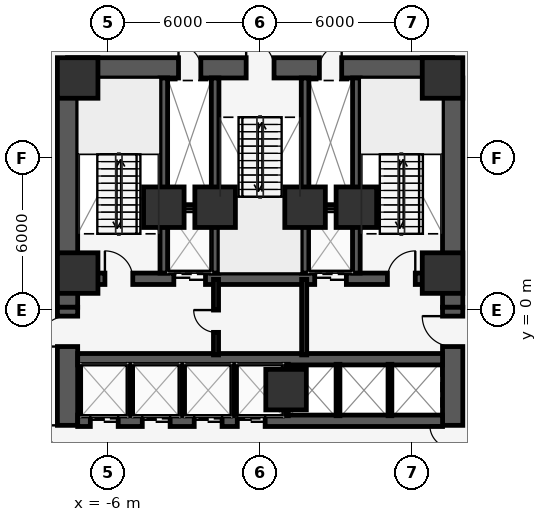
"""IFC4 building model, lengths in metres.
Left out: names, types, materials, properties, quantities, classifications, styles, units other than length and angle.
Written with IfcOpenShell. Run it as: python <this file> out.ifc"""

import sys

from ifc_helpers import new_model, si_unit, direction, frame, frame_2d, origin, origin_2d, place, context, subcontext, project, spatial, rectangle, extrude, element, fill, save


model = new_model("IFC4")
c1 = context("Model", 3, precision=1e-05, world=origin(), true_north=direction((0.0, 1.0)))
c2 = subcontext(c1, "Body", "Model", "MODEL_VIEW")
j1 = project(units=[si_unit("LENGTHUNIT", "METRE"), si_unit("PLANEANGLEUNIT", "RADIAN")], contexts=[c1])
p1 = place(None, origin())
s1 = spatial("IfcSite", under=j1, at=p1, CompositionType="ELEMENT")
p2 = place(p1, origin())
s2 = spatial("IfcBuilding", under=s1, at=p2, CompositionType="ELEMENT")
p3 = place(p2, frame((0.0, 0.0, 50.4)))
s3 = spatial("IfcBuildingStorey", under=s2, at=p3, CompositionType="ELEMENT", Elevation=50.4)
p4 = place(p3, frame((-7.6, 9.55, 0.0), z_axis=(0.0, 0.0, 1.0), x_axis=(1.0, 0.0, 0.0)))
e1 = element("IfcWall", 1, at=p4, inside=s3, PredefinedType="SHEAR", context=c2, shape_type="SweptSolid", body=[
    extrude(rectangle(XDim=15.2, YDim=0.8, at=frame_2d((7.6, 0.0))), origin(), (0.0, 0.0, 1.0), 3.75),
])
p5 = place(p4, frame((7.05, 0.0, 0.0)))
e2 = element("IfcOpeningElement", 2, at=p5, cuts=e1, PredefinedType="OPENING", context=c2, shape_type="SweptSolid", body=[
    extrude(rectangle(XDim=1.1, YDim=2.15, at=frame_2d((0.55, 1.075))), frame((0.0, 0.41, 0.0), z_axis=(0.0, -1.0, 0.0), x_axis=(1.0, 0.0, 0.0)), (0.0, 0.0, 1.0), 0.82),
])
p6 = place(p4, frame((4.38, 0.0, 0.0)))
e3 = element("IfcOpeningElement", 3, at=p6, cuts=e1, PredefinedType="OPENING", context=c2, shape_type="SweptSolid", body=[
    extrude(rectangle(XDim=0.88, YDim=2.15, at=frame_2d((0.44, 1.075))), frame((0.0, 0.41, 0.0), z_axis=(0.0, -1.0, 0.0), x_axis=(1.0, 0.0, 0.0)), (0.0, 0.0, 1.0), 0.82),
])
p7 = place(p4, frame((9.94, 0.0, 0.0)))
e4 = element("IfcOpeningElement", 4, at=p7, cuts=e1, PredefinedType="OPENING", context=c2, shape_type="SweptSolid", body=[
    extrude(rectangle(XDim=0.88, YDim=2.15, at=frame_2d((0.44, 1.075))), frame((0.0, 0.41, 0.0), z_axis=(0.0, -1.0, 0.0), x_axis=(1.0, 0.0, 0.0)), (0.0, 0.0, 1.0), 0.82),
])
p8 = place(p3, frame((-7.2, 1.225, 0.0), z_axis=(0.0, 0.0, 1.0), x_axis=(1.0, 0.0, 0.0)))
e5 = element("IfcWall", 5, at=p8, inside=s3, PredefinedType="SHEAR", context=c2, shape_type="SweptSolid", body=[
    extrude(rectangle(XDim=14.4, YDim=0.45, at=frame_2d((7.2, 0.0))), origin(), (0.0, 0.0, 1.0), 3.75),
])
p9 = place(p8, frame((3.795, 0.0, 0.0)))
e6 = element("IfcOpeningElement", 6, at=p9, cuts=e5, PredefinedType="OPENING", context=c2, shape_type="SweptSolid", body=[
    extrude(rectangle(XDim=1.25, YDim=2.25, at=frame_2d((0.625, 1.125))), frame((0.0, 0.235, 0.0), z_axis=(0.0, -1.0, 0.0), x_axis=(1.0, 0.0, 0.0)), (0.0, 0.0, 1.0), 0.47),
])
p10 = place(p8, frame((9.355, 0.0, 0.0)))
e7 = element("IfcOpeningElement", 7, at=p10, cuts=e5, PredefinedType="OPENING", context=c2, shape_type="SweptSolid", body=[
    extrude(rectangle(XDim=1.25, YDim=2.25, at=frame_2d((0.625, 1.125))), frame((0.0, 0.235, 0.0), z_axis=(0.0, -1.0, 0.0), x_axis=(1.0, 0.0, 0.0)), (0.0, 0.0, 1.0), 0.47),
])
p11 = place(p8, frame((1.075, 0.0, 0.0)))
e8 = element("IfcOpeningElement", 8, at=p11, cuts=e5, PredefinedType="OPENING", context=c2, shape_type="SweptSolid", body=[
    extrude(rectangle(XDim=1.1, YDim=2.15, at=frame_2d((0.55, 1.075))), frame((0.0, 0.235, 0.0), z_axis=(0.0, -1.0, 0.0), x_axis=(1.0, 0.0, 0.0)), (0.0, 0.0, 1.0), 0.47),
])
p12 = place(p8, frame((12.225, 0.0, 0.0)))
e9 = element("IfcOpeningElement", 9, at=p12, cuts=e5, PredefinedType="OPENING", context=c2, shape_type="SweptSolid", body=[
    extrude(rectangle(XDim=1.1, YDim=2.15, at=frame_2d((0.55, 1.075))), frame((0.0, 0.235, 0.0), z_axis=(0.0, -1.0, 0.0), x_axis=(1.0, 0.0, 0.0)), (0.0, 0.0, 1.0), 0.47),
])
for number, where, z_axis, x_axis in (
    (10, (-3.8, 1.45, 0.0), (0.0, 0.0, 1.0), (0.0, 1.0, 0.0)),
    (11, (-1.775, 1.45, 0.0), (0.0, 0.0, 1.0), (0.0, 1.0, 0.0)),
    (12, (1.775, 1.45, 0.0), (0.0, 0.0, 1.0), (0.0, 1.0, 0.0)),
    (13, (3.8, 1.45, 0.0), (0.0, 0.0, 1.0), (0.0, 1.0, 0.0)),
):
    element("IfcWall", number, at=place(p3, frame(where, z_axis=z_axis, x_axis=x_axis)), inside=s3, PredefinedType="SHEAR", context=c2, shape_type="SweptSolid", body=[
        extrude(rectangle(XDim=7.7, YDim=0.3, at=frame_2d((3.85, 0.0))), origin(), (0.0, 0.0, 1.0), 3.75),
    ])
for number, where, z_axis, x_axis in (
    (14, (-7.6, 0.1, 0.0), (0.0, 0.0, 1.0), (0.0, 1.0, 0.0)),
    (15, (7.6, 0.1, 0.0), (0.0, 0.0, 1.0), (0.0, 1.0, 0.0)),
):
    element("IfcWall", number, at=place(p3, frame(where, z_axis=z_axis, x_axis=x_axis)), inside=s3, PredefinedType="SHEAR", context=c2, shape_type="SweptSolid", body=[
        extrude(rectangle(XDim=9.05, YDim=0.8, at=frame_2d((4.525, 0.0))), origin(), (0.0, 0.0, 1.0), 3.75),
    ])
p13 = place(p3, frame((-7.6, -8.85, 0.0), z_axis=(0.0, 0.0, 1.0), x_axis=(0.0, 1.0, 0.0)))
e16 = element("IfcWall", 16, at=p13, inside=s3, PredefinedType="SHEAR", context=c2, shape_type="SweptSolid", body=[
    extrude(rectangle(XDim=8.95, YDim=0.8, at=frame_2d((4.475, 0.0))), origin(), (0.0, 0.0, 1.0), 3.75),
])
p14 = place(p13, frame((2.49, 0.0, 0.0)))
e17 = element("IfcOpeningElement", 17, at=p14, cuts=e16, PredefinedType="OPENING", context=c2, shape_type="SweptSolid", body=[
    extrude(rectangle(XDim=1.8, YDim=2.2, at=frame_2d((0.9, 1.1))), frame((0.0, 0.41, 0.0), z_axis=(0.0, -1.0, 0.0), x_axis=(1.0, 0.0, 0.0)), (0.0, 0.0, 1.0), 0.82),
])
p15 = place(p13, frame((7.4, 0.0, 0.0)))
e18 = element("IfcOpeningElement", 18, at=p15, cuts=e16, PredefinedType="OPENING", context=c2, shape_type="SweptSolid", body=[
    extrude(rectangle(XDim=1.2, YDim=2.15, at=frame_2d((0.6, 1.075))), frame((0.0, 0.41, 0.0), z_axis=(0.0, -1.0, 0.0), x_axis=(1.0, 0.0, 0.0)), (0.0, 0.0, 1.0), 0.82),
])
p16 = place(p3, frame((7.6, -8.85, 0.0), z_axis=(0.0, 0.0, 1.0), x_axis=(0.0, 1.0, 0.0)))
e19 = element("IfcWall", 19, at=p16, inside=s3, PredefinedType="SHEAR", context=c2, shape_type="SweptSolid", body=[
    extrude(rectangle(XDim=8.95, YDim=0.8, at=frame_2d((4.475, 0.0))), origin(), (0.0, 0.0, 1.0), 3.75),
])
p17 = place(p16, frame((2.49, 0.0, 0.0)))
e20 = element("IfcOpeningElement", 20, at=p17, cuts=e19, PredefinedType="OPENING", context=c2, shape_type="SweptSolid", body=[
    extrude(rectangle(XDim=1.8, YDim=2.2, at=frame_2d((0.9, 1.1))), frame((0.0, 0.41, 0.0), z_axis=(0.0, -1.0, 0.0), x_axis=(1.0, 0.0, 0.0)), (0.0, 0.0, 1.0), 0.82),
])
p18 = place(p16, frame((7.4, 0.0, 0.0)))
e21 = element("IfcOpeningElement", 21, at=p18, cuts=e19, PredefinedType="OPENING", context=c2, shape_type="SweptSolid", body=[
    extrude(rectangle(XDim=1.2, YDim=2.15, at=frame_2d((0.6, 1.075))), frame((0.0, 0.41, 0.0), z_axis=(0.0, -1.0, 0.0), x_axis=(1.0, 0.0, 0.0)), (0.0, 0.0, 1.0), 0.82),
])
p19 = place(p3, frame((-7.2, -1.95, 0.0), z_axis=(0.0, 0.0, 1.0), x_axis=(1.0, 0.0, 0.0)))
e22 = element("IfcWall", 22, at=p19, inside=s3, PredefinedType="SHEAR", context=c2, shape_type="SweptSolid", body=[
    extrude(rectangle(XDim=14.4, YDim=0.45, at=frame_2d((7.2, 0.0))), origin(), (0.0, 0.0, 1.0), 3.75),
])
p20 = place(p3, frame((-7.2, -4.38, 0.0), z_axis=(0.0, 0.0, 1.0), x_axis=(1.0, 0.0, 0.0)))
e23 = element("IfcWall", 23, at=p20, inside=s3, PredefinedType="SHEAR", context=c2, shape_type="SweptSolid", body=[
    extrude(rectangle(XDim=14.4, YDim=0.45, at=frame_2d((7.2, 0.0))), origin(), (0.0, 0.0, 1.0), 3.75),
])
p21 = place(p20, frame((0.5, 0.0, 0.0)))
e24 = element("IfcOpeningElement", 24, at=p21, cuts=e23, PredefinedType="OPENING", context=c2, shape_type="SweptSolid", body=[
    extrude(rectangle(XDim=1.1, YDim=2.2, at=frame_2d((0.55, 1.1))), frame((0.0, 0.235, 0.0), z_axis=(0.0, -1.0, 0.0), x_axis=(1.0, 0.0, 0.0)), (0.0, 0.0, 1.0), 0.47),
])
p22 = place(p20, frame((2.55, 0.0, 0.0)))
e25 = element("IfcOpeningElement", 25, at=p22, cuts=e23, PredefinedType="OPENING", context=c2, shape_type="SweptSolid", body=[
    extrude(rectangle(XDim=1.1, YDim=2.2, at=frame_2d((0.55, 1.1))), frame((0.0, 0.235, 0.0), z_axis=(0.0, -1.0, 0.0), x_axis=(1.0, 0.0, 0.0)), (0.0, 0.0, 1.0), 0.47),
])
p23 = place(p20, frame((4.6, 0.0, 0.0)))
e26 = element("IfcOpeningElement", 26, at=p23, cuts=e23, PredefinedType="OPENING", context=c2, shape_type="SweptSolid", body=[
    extrude(rectangle(XDim=1.1, YDim=2.2, at=frame_2d((0.55, 1.1))), frame((0.0, 0.235, 0.0), z_axis=(0.0, -1.0, 0.0), x_axis=(1.0, 0.0, 0.0)), (0.0, 0.0, 1.0), 0.47),
])
p24 = place(p20, frame((6.3, 0.0, 0.0)))
e27 = element("IfcOpeningElement", 27, at=p24, cuts=e23, PredefinedType="OPENING", context=c2, shape_type="SweptSolid", body=[
    extrude(rectangle(XDim=1.1, YDim=2.2, at=frame_2d((0.55, 1.1))), frame((0.0, 0.235, 0.0), z_axis=(0.0, -1.0, 0.0), x_axis=(1.0, 0.0, 0.0)), (0.0, 0.0, 1.0), 0.47),
])
for number, where, z_axis, x_axis in (
    (28, (7.2, 1.45, 0.0), (0.0, 0.0, 1.0), (1.0, 0.0, 0.0)),
    (29, (7.2, 9.15, 0.0), (0.0, 0.0, 1.0), (1.0, 0.0, 0.0)),
    (30, (-7.2, 9.15, 0.0), (0.0, 0.0, 1.0), (1.0, 0.0, 0.0)),
    (31, (-7.2, 1.45, 0.0), (0.0, 0.0, 1.0), (1.0, 0.0, 0.0)),
    (32, (-3.8, 4.05, 0.0), (0.0, 0.0, 1.0), (1.0, 0.0, 0.0)),
    (33, (3.8, 4.05, 0.0), (0.0, 0.0, 1.0), (1.0, 0.0, 0.0)),
    (34, (-1.775, 4.05, 0.0), (0.0, 0.0, 1.0), (1.0, 0.0, 0.0)),
    (35, (1.775, 4.05, 0.0), (0.0, 0.0, 1.0), (1.0, 0.0, 0.0)),
    (36, (1.025, -3.15, 0.0), (0.0, 0.0, 1.0), (1.0, 0.0, 0.0)),
):
    element("IfcColumn", number, at=place(p3, frame(where, z_axis=z_axis, x_axis=x_axis)), inside=s3, PredefinedType="COLUMN", context=c2, shape_type="SweptSolid", body=[
        extrude(rectangle(XDim=1.6, YDim=1.6, at=origin_2d()), origin(), (0.0, 0.0, 1.0), 4.0),
    ])
p25 = place(p3, frame((4.923, 41.122, 0.0), z_axis=(0.0, 0.0, 1.0), x_axis=(0.504213113214, -0.863579258935, 0.0)))
e37 = element("IfcWall", 37, at=p25, inside=s3, PredefinedType="STANDARD", context=c2, shape_type="SweptSolid", body=[
    extrude(rectangle(XDim=67.041, YDim=0.32, at=frame_2d((33.521, 0.0))), origin(), (0.0, 0.0, 1.0), 3.75),
])
p26 = place(p25, frame((33.021, 0.0, 0.0)))
e38 = element("IfcOpeningElement", 38, at=p26, cuts=e37, PredefinedType="OPENING", context=c2, shape_type="SweptSolid", body=[
    extrude(rectangle(XDim=1.0, YDim=2.15, at=frame_2d((0.5, 1.075))), frame((0.0, 0.17, 0.0), z_axis=(0.0, -1.0, 0.0), x_axis=(1.0, 0.0, 0.0)), (0.0, 0.0, 1.0), 0.34),
])
p27 = place(p3, frame((-38.726, -16.773, 0.0), z_axis=(0.0, 0.0, 1.0), x_axis=(0.504213113214, 0.863579258935, 0.0)))
e39 = element("IfcWall", 39, at=p27, inside=s3, PredefinedType="STANDARD", context=c2, shape_type="SweptSolid", body=[
    extrude(rectangle(XDim=67.041, YDim=0.32, at=frame_2d((33.521, 0.0))), origin(), (0.0, 0.0, 1.0), 3.75),
])
p28 = place(p27, frame((33.021, 0.0, 0.0)))
e40 = element("IfcOpeningElement", 40, at=p28, cuts=e39, PredefinedType="OPENING", context=c2, shape_type="SweptSolid", body=[
    extrude(rectangle(XDim=1.0, YDim=2.15, at=frame_2d((0.5, 1.075))), frame((0.0, 0.17, 0.0), z_axis=(0.0, -1.0, 0.0), x_axis=(1.0, 0.0, 0.0)), (0.0, 0.0, 1.0), 0.34),
])
for number, where, z_axis, x_axis in (
    (41, (-3.65, 4.05, 0.0), (0.0, 0.0, 1.0), (1.0, 0.0, 0.0)),
    (42, (1.92, 4.05, 0.0), (0.0, 0.0, 1.0), (1.0, 0.0, 0.0)),
):
    element("IfcWall", number, at=place(p3, frame(where, z_axis=z_axis, x_axis=x_axis)), inside=s3, PredefinedType="PARTITIONING", context=c2, shape_type="SweptSolid", body=[
        extrude(rectangle(XDim=1.73, YDim=0.2, at=frame_2d((0.865, 0.0))), origin(), (0.0, 0.0, 1.0), 3.75),
    ])
for number, where, z_axis, x_axis in (
    (43, (-5.125, -4.18, 0.0), (0.0, 0.0, 1.0), (0.0, 1.0, 0.0)),
    (44, (-3.075, -4.18, 0.0), (0.0, 0.0, 1.0), (0.0, 1.0, 0.0)),
    (45, (-1.025, -4.18, 0.0), (0.0, 0.0, 1.0), (0.0, 1.0, 0.0)),
):
    element("IfcWall", number, at=place(p3, frame(where, z_axis=z_axis, x_axis=x_axis)), inside=s3, PredefinedType="PARTITIONING", context=c2, shape_type="SweptSolid", body=[
        extrude(rectangle(XDim=2.03, YDim=0.15, at=frame_2d((1.015, 0.0))), origin(), (0.0, 0.0, 1.0), 3.75),
    ])
p29 = place(p3, frame((1.025, -4.18, 0.0), z_axis=(0.0, 0.0, 1.0), x_axis=(0.0, 1.0, 0.0)))
e46 = element("IfcWall", 46, at=p29, inside=s3, PredefinedType="PARTITIONING", context=c2, shape_type="SweptSolid", body=[
    extrude(rectangle(XDim=2.03, YDim=0.18, at=frame_2d((1.015, 0.0))), origin(), (0.0, 0.0, 1.0), 2.798),
])
for number, where, z_axis, x_axis in (
    (47, (3.075, -4.18, 0.0), (0.0, 0.0, 1.0), (0.0, 1.0, 0.0)),
    (48, (5.125, -4.18, 0.0), (0.0, 0.0, 1.0), (0.0, 1.0, 0.0)),
):
    element("IfcWall", number, at=place(p3, frame(where, z_axis=z_axis, x_axis=x_axis)), inside=s3, PredefinedType="PARTITIONING", context=c2, shape_type="SweptSolid", body=[
        extrude(rectangle(XDim=2.03, YDim=0.15, at=frame_2d((1.015, 0.0))), origin(), (0.0, 0.0, 1.0), 3.75),
    ])
p30 = place(p3, frame((-1.74, -1.78, 0.0), z_axis=(0.0, 0.0, 1.0), x_axis=(0.0, 1.0, 0.0)))
e49 = element("IfcWall", 49, at=p30, inside=s3, PredefinedType="PARTITIONING", context=c2, shape_type="SweptSolid", body=[
    extrude(rectangle(XDim=2.98, YDim=0.2, at=frame_2d((1.49, 0.0))), origin(), (0.0, 0.0, 1.0), 3.75),
])
p31 = place(p30, frame((0.89, 0.0, 0.0)))
e50 = element("IfcOpeningElement", 50, at=p31, cuts=e49, PredefinedType="OPENING", context=c2, shape_type="SweptSolid", body=[
    extrude(rectangle(XDim=0.88, YDim=2.15, at=frame_2d((0.44, 1.075))), frame((0.0, 0.11, 0.0), z_axis=(0.0, -1.0, 0.0), x_axis=(1.0, 0.0, 0.0)), (0.0, 0.0, 1.0), 0.22),
])
p32 = place(p3, frame((1.74, -1.78, 0.0), z_axis=(0.0, 0.0, 1.0), x_axis=(0.0, 1.0, 0.0)))
e51 = element("IfcWall", 51, at=p32, inside=s3, PredefinedType="PARTITIONING", context=c2, shape_type="SweptSolid", body=[
    extrude(rectangle(XDim=2.98, YDim=0.2, at=frame_2d((1.49, 0.0))), origin(), (0.0, 0.0, 1.0), 3.75),
])
p33 = place(p21, origin())
e52 = element("IfcDoor", 52, at=p33, inside=s3, OperationType="DOUBLE_DOOR_SLIDING", PredefinedType="DOOR", context=c2, shape_type="SweptSolid", body=[
    extrude(rectangle(XDim=1.1, YDim=2.2, at=frame_2d((0.55, 1.1))), frame((0.0, 0.025, 0.0), z_axis=(0.0, -1.0, 0.0), x_axis=(1.0, 0.0, 0.0)), (0.0, 0.0, 1.0), 0.05),
])
fill(e24, e52)
p34 = place(p22, origin())
e53 = element("IfcDoor", 53, at=p34, inside=s3, OperationType="DOUBLE_DOOR_SLIDING", PredefinedType="DOOR", context=c2, shape_type="SweptSolid", body=[
    extrude(rectangle(XDim=1.1, YDim=2.2, at=frame_2d((0.55, 1.1))), frame((0.0, 0.025, 0.0), z_axis=(0.0, -1.0, 0.0), x_axis=(1.0, 0.0, 0.0)), (0.0, 0.0, 1.0), 0.05),
])
fill(e25, e53)
p35 = place(p23, origin())
e54 = element("IfcDoor", 54, at=p35, inside=s3, OperationType="DOUBLE_DOOR_SLIDING", PredefinedType="DOOR", context=c2, shape_type="SweptSolid", body=[
    extrude(rectangle(XDim=1.1, YDim=2.2, at=frame_2d((0.55, 1.1))), frame((0.0, 0.025, 0.0), z_axis=(0.0, -1.0, 0.0), x_axis=(1.0, 0.0, 0.0)), (0.0, 0.0, 1.0), 0.05),
])
fill(e26, e54)
p36 = place(p24, origin())
e55 = element("IfcDoor", 55, at=p36, inside=s3, OperationType="DOUBLE_DOOR_SLIDING", PredefinedType="DOOR", context=c2, shape_type="SweptSolid", body=[
    extrude(rectangle(XDim=1.1, YDim=2.2, at=frame_2d((0.55, 1.1))), frame((0.0, 0.025, 0.0), z_axis=(0.0, -1.0, 0.0), x_axis=(1.0, 0.0, 0.0)), (0.0, 0.0, 1.0), 0.05),
])
fill(e27, e55)
p37 = place(p9, origin())
e56 = element("IfcDoor", 56, at=p37, inside=s3, OperationType="DOUBLE_DOOR_SLIDING", PredefinedType="DOOR", context=c2, shape_type="SweptSolid", body=[
    extrude(rectangle(XDim=1.25, YDim=2.25, at=frame_2d((0.625, 1.125))), frame((0.0, 0.025, 0.0), z_axis=(0.0, -1.0, 0.0), x_axis=(1.0, 0.0, 0.0)), (0.0, 0.0, 1.0), 0.05),
])
fill(e6, e56)
p38 = place(p10, origin())
e57 = element("IfcDoor", 57, at=p38, inside=s3, OperationType="DOUBLE_DOOR_SLIDING", PredefinedType="DOOR", context=c2, shape_type="SweptSolid", body=[
    extrude(rectangle(XDim=1.25, YDim=2.25, at=frame_2d((0.625, 1.125))), frame((0.0, 0.025, 0.0), z_axis=(0.0, -1.0, 0.0), x_axis=(1.0, 0.0, 0.0)), (0.0, 0.0, 1.0), 0.05),
])
fill(e7, e57)
p39 = place(p11, origin())
e58 = element("IfcDoor", 58, at=p39, inside=s3, OperationType="SINGLE_SWING_LEFT", PredefinedType="DOOR", context=c2, shape_type="SweptSolid", body=[
    extrude(rectangle(XDim=1.1, YDim=2.15, at=frame_2d((0.55, 1.075))), frame((0.0, 0.025, 0.0), z_axis=(0.0, -1.0, 0.0), x_axis=(1.0, 0.0, 0.0)), (0.0, 0.0, 1.0), 0.05),
])
fill(e8, e58)
p40 = place(p12, origin())
e59 = element("IfcDoor", 59, at=p40, inside=s3, OperationType="SINGLE_SWING_RIGHT", PredefinedType="DOOR", context=c2, shape_type="SweptSolid", body=[
    extrude(rectangle(XDim=1.1, YDim=2.15, at=frame_2d((0.55, 1.075))), frame((0.0, 0.025, 0.0), z_axis=(0.0, -1.0, 0.0), x_axis=(1.0, 0.0, 0.0)), (0.0, 0.0, 1.0), 0.05),
])
fill(e9, e59)
p41 = place(p5, origin())
e60 = element("IfcDoor", 60, at=p41, inside=s3, OperationType="SINGLE_SWING_LEFT", PredefinedType="DOOR", context=c2, shape_type="SweptSolid", body=[
    extrude(rectangle(XDim=1.1, YDim=2.15, at=frame_2d((0.55, 1.075))), frame((0.0, 0.025, 0.0), z_axis=(0.0, -1.0, 0.0), x_axis=(1.0, 0.0, 0.0)), (0.0, 0.0, 1.0), 0.05),
])
fill(e2, e60)
p42 = place(p6, origin())
e61 = element("IfcDoor", 61, at=p42, inside=s3, OperationType="SINGLE_SWING_LEFT", PredefinedType="DOOR", context=c2, shape_type="SweptSolid", body=[
    extrude(rectangle(XDim=0.88, YDim=2.15, at=frame_2d((0.44, 1.075))), frame((0.0, 0.025, 0.0), z_axis=(0.0, -1.0, 0.0), x_axis=(1.0, 0.0, 0.0)), (0.0, 0.0, 1.0), 0.05),
])
fill(e3, e61)
p43 = place(p7, origin())
e62 = element("IfcDoor", 62, at=p43, inside=s3, OperationType="SINGLE_SWING_RIGHT", PredefinedType="DOOR", context=c2, shape_type="SweptSolid", body=[
    extrude(rectangle(XDim=0.88, YDim=2.15, at=frame_2d((0.44, 1.075))), frame((0.0, 0.025, 0.0), z_axis=(0.0, -1.0, 0.0), x_axis=(1.0, 0.0, 0.0)), (0.0, 0.0, 1.0), 0.05),
])
fill(e4, e62)
p44 = place(p14, origin())
e63 = element("IfcDoor", 63, at=p44, inside=s3, OperationType="DOUBLE_DOOR_SINGLE_SWING", PredefinedType="DOOR", context=c2, shape_type="SweptSolid", body=[
    extrude(rectangle(XDim=1.8, YDim=2.2, at=frame_2d((0.9, 1.1))), frame((0.0, 0.025, 0.0), z_axis=(0.0, -1.0, 0.0), x_axis=(1.0, 0.0, 0.0)), (0.0, 0.0, 1.0), 0.05),
])
fill(e17, e63)
p45 = place(p15, origin())
e64 = element("IfcDoor", 64, at=p45, inside=s3, OperationType="SINGLE_SWING_LEFT", PredefinedType="DOOR", context=c2, shape_type="SweptSolid", body=[
    extrude(rectangle(XDim=1.2, YDim=2.15, at=frame_2d((0.6, 1.075))), frame((0.0, 0.025, 0.0), z_axis=(0.0, -1.0, 0.0), x_axis=(1.0, 0.0, 0.0)), (0.0, 0.0, 1.0), 0.05),
])
fill(e18, e64)
p46 = place(p17, origin())
e65 = element("IfcDoor", 65, at=p46, inside=s3, OperationType="DOUBLE_DOOR_SINGLE_SWING", PredefinedType="DOOR", context=c2, shape_type="SweptSolid", body=[
    extrude(rectangle(XDim=1.8, YDim=2.2, at=frame_2d((0.9, 1.1))), frame((0.0, 0.025, 0.0), z_axis=(0.0, -1.0, 0.0), x_axis=(1.0, 0.0, 0.0)), (0.0, 0.0, 1.0), 0.05),
])
fill(e20, e65)
p47 = place(p18, origin())
e66 = element("IfcDoor", 66, at=p47, inside=s3, OperationType="SINGLE_SWING_RIGHT", PredefinedType="DOOR", context=c2, shape_type="SweptSolid", body=[
    extrude(rectangle(XDim=1.2, YDim=2.15, at=frame_2d((0.6, 1.075))), frame((0.0, 0.025, 0.0), z_axis=(0.0, -1.0, 0.0), x_axis=(1.0, 0.0, 0.0)), (0.0, 0.0, 1.0), 0.05),
])
fill(e21, e66)
p48 = place(p31, origin())
e67 = element("IfcDoor", 67, at=p48, inside=s3, OperationType="SINGLE_SWING_RIGHT", PredefinedType="DOOR", context=c2, shape_type="SweptSolid", body=[
    extrude(rectangle(XDim=0.88, YDim=2.15, at=frame_2d((0.44, 1.075))), frame((0.0, 0.025, 0.0), z_axis=(0.0, -1.0, 0.0), x_axis=(1.0, 0.0, 0.0)), (0.0, 0.0, 1.0), 0.05),
])
fill(e50, e67)
save(model, sys.argv[1])
